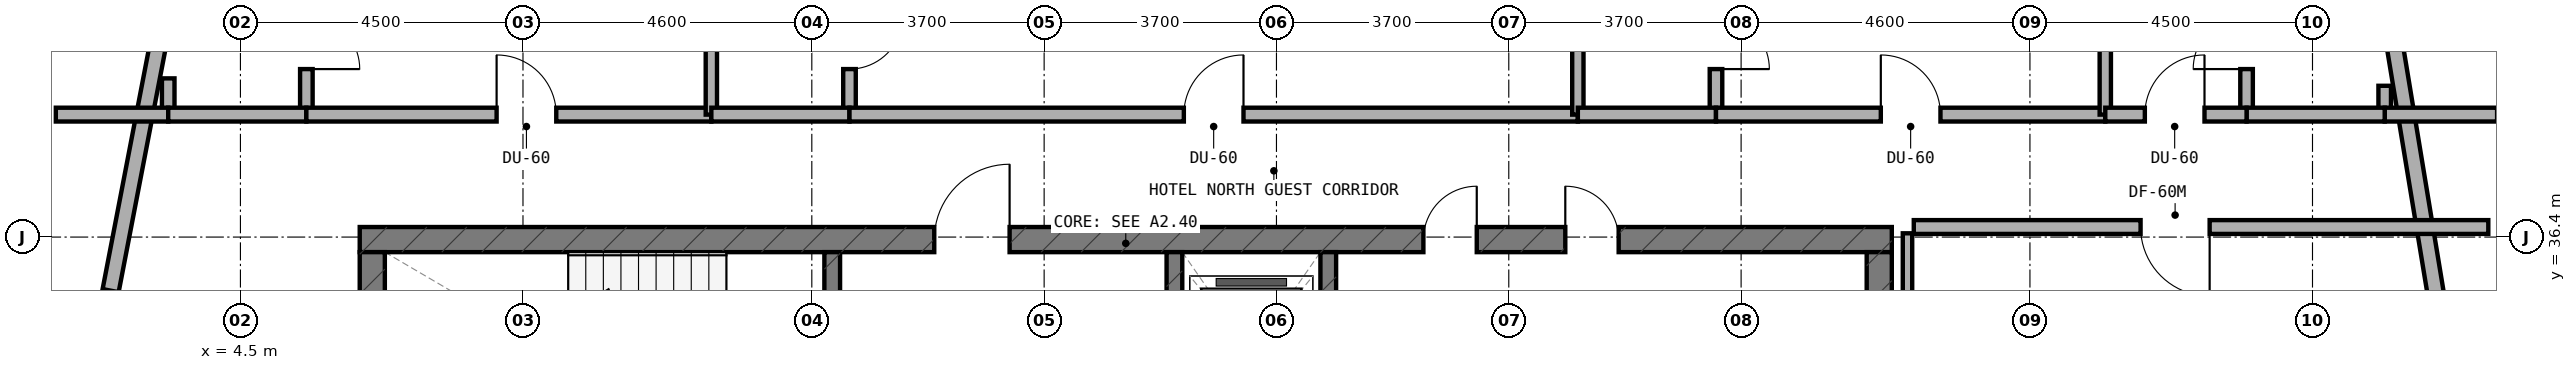
"""IFC4 building model, lengths in metres.
Left out: names, types, materials, properties, quantities, classifications, styles, units other than length and angle.
Written with IfcOpenShell. Run it as: python <this file> out.ifc"""

import sys

from ifc_helpers import new_model, si_unit, direction, frame, frame_2d, origin, place, context, subcontext, project, spatial, rectangle, extrude, element, fill, save


model = new_model("IFC4")
c1 = context("Model", 3, precision=1e-05, world=origin(), true_north=direction((0.0, 1.0)))
c2 = subcontext(c1, "Body", "Model", "MODEL_VIEW")
j1 = project(units=[si_unit("LENGTHUNIT", "METRE"), si_unit("PLANEANGLEUNIT", "RADIAN")], contexts=[c1])
p1 = place(None, origin())
s1 = spatial("IfcSite", under=j1, at=p1, CompositionType="ELEMENT")
p2 = place(p1, origin())
s2 = spatial("IfcBuilding", under=s1, at=p2, CompositionType="ELEMENT")
p3 = place(p2, frame((0.0, 0.0, 177.5)))
s3 = spatial("IfcBuildingStorey", under=s2, at=p3, CompositionType="ELEMENT", Elevation=177.5)
p4 = place(p3, frame((6.4, 36.36, 0.0), z_axis=(0.0, 0.0, 1.0), x_axis=(1.0, 0.0, 0.0)))
e1 = element("IfcWall", 1, at=p4, inside=s3, PredefinedType="SHEAR", context=c2, shape_type="SweptSolid", body=[
    extrude(rectangle(XDim=24.4, YDim=0.4, at=frame_2d((12.2, 0.0))), origin(), (0.0, 0.0, 1.0), 3.6),
])
p5 = place(p4, frame((9.15, 0.0, 0.0)))
e2 = element("IfcOpeningElement", 2, at=p5, cuts=e1, PredefinedType="OPENING", context=c2, shape_type="SweptSolid", body=[
    extrude(rectangle(XDim=1.2, YDim=2.15, at=frame_2d((0.6, 1.075))), frame((0.0, 0.21, 0.0), z_axis=(0.0, -1.0, 0.0), x_axis=(1.0, 0.0, 0.0)), (0.0, 0.0, 1.0), 0.42),
])
p6 = place(p4, frame((19.2, 0.0, 0.0)))
e3 = element("IfcOpeningElement", 3, at=p6, cuts=e1, PredefinedType="OPENING", context=c2, shape_type="SweptSolid", body=[
    extrude(rectangle(XDim=0.85, YDim=2.1, at=frame_2d((0.425, 1.05))), frame((0.0, 0.21, 0.0), z_axis=(0.0, -1.0, 0.0), x_axis=(1.0, 0.0, 0.0)), (0.0, 0.0, 1.0), 0.42),
])
p7 = place(p4, frame((16.94, 0.0, 0.0)))
e4 = element("IfcOpeningElement", 4, at=p7, cuts=e1, PredefinedType="OPENING", context=c2, shape_type="SweptSolid", body=[
    extrude(rectangle(XDim=0.85, YDim=2.1, at=frame_2d((0.425, 1.05))), frame((0.0, 0.21, 0.0), z_axis=(0.0, -1.0, 0.0), x_axis=(1.0, 0.0, 0.0)), (0.0, 0.0, 1.0), 0.42),
])
for number, where, z_axis, x_axis in (
    (5, (6.6, 33.0, 0.0), (0.0, 0.0, 1.0), (0.0, 1.0, 0.0)),
    (6, (30.6, 33.0, 0.0), (0.0, 0.0, 1.0), (0.0, 1.0, 0.0)),
):
    element("IfcWall", number, at=place(p3, frame(where, z_axis=z_axis, x_axis=x_axis)), inside=s3, PredefinedType="SHEAR", context=c2, shape_type="SweptSolid", body=[
        extrude(rectangle(XDim=3.16, YDim=0.4, at=frame_2d((1.58, 0.0))), origin(), (0.0, 0.0, 1.0), 3.6),
    ])
p8 = place(p3, frame((13.925, 33.0, 0.0), z_axis=(0.0, 0.0, 1.0), x_axis=(0.0, 1.0, 0.0)))
e7 = element("IfcWall", 7, at=p8, inside=s3, PredefinedType="STANDARD", context=c2, shape_type="SweptSolid", body=[
    extrude(rectangle(XDim=3.16, YDim=0.25, at=frame_2d((1.58, 0.0))), origin(), (0.0, 0.0, 1.0), 3.32),
])
p9 = place(p8, frame((0.98, 0.0, 0.0)))
e8 = element("IfcOpeningElement", 8, at=p9, cuts=e7, PredefinedType="OPENING", context=c2, shape_type="SweptSolid", body=[
    extrude(rectangle(XDim=1.1, YDim=2.15, at=frame_2d((0.55, 1.075))), frame((0.0, 0.135, 0.0), z_axis=(0.0, -1.0, 0.0), x_axis=(1.0, 0.0, 0.0)), (0.0, 0.0, 1.0), 0.27),
])
p10 = place(p3, frame((19.375, 33.0, 0.0), z_axis=(0.0, 0.0, 1.0), x_axis=(0.0, 1.0, 0.0)))
e9 = element("IfcWall", 9, at=p10, inside=s3, PredefinedType="STANDARD", context=c2, shape_type="SweptSolid", body=[
    extrude(rectangle(XDim=3.16, YDim=0.25, at=frame_2d((1.58, 0.0))), origin(), (0.0, 0.0, 1.0), 3.32),
])
p11 = place(p10, frame((0.98, 0.0, 0.0)))
e10 = element("IfcOpeningElement", 10, at=p11, cuts=e9, PredefinedType="OPENING", context=c2, shape_type="SweptSolid", body=[
    extrude(rectangle(XDim=1.1, YDim=2.15, at=frame_2d((0.55, 1.075))), frame((0.0, 0.135, 0.0), z_axis=(0.0, -1.0, 0.0), x_axis=(1.0, 0.0, 0.0)), (0.0, 0.0, 1.0), 0.27),
])
p12 = place(p3, frame((21.825, 33.0, 0.0), z_axis=(0.0, 0.0, 1.0), x_axis=(0.0, 1.0, 0.0)))
e11 = element("IfcWall", 11, at=p12, inside=s3, PredefinedType="STANDARD", context=c2, shape_type="SweptSolid", body=[
    extrude(rectangle(XDim=3.16, YDim=0.25, at=frame_2d((1.58, 0.0))), origin(), (0.0, 0.0, 1.0), 3.32),
])
p13 = place(p3, frame((40.476, 29.354, 0.0), z_axis=(0.0, 0.0, 1.0), x_axis=(-0.162811037825, 0.986657268742, 0.0)))
e12 = element("IfcWall", 12, at=p13, inside=s3, PredefinedType="STANDARD", context=c2, shape_type="SweptSolid", body=[
    extrude(rectangle(XDim=10.473, YDim=0.26, at=frame_2d((5.236, 0.0))), origin(), (0.0, 0.0, 1.0), 3.32),
])
p14 = place(p13, frame((2.545, 0.0, 0.85)))
e13 = element("IfcOpeningElement", 13, at=p14, cuts=e12, PredefinedType="OPENING", context=c2, shape_type="SweptSolid", body=[
    extrude(rectangle(XDim=2.1, YDim=1.5, at=frame_2d((1.05, 0.75))), frame((0.0, 0.14, 0.0), z_axis=(0.0, -1.0, 0.0), x_axis=(1.0, 0.0, 0.0)), (0.0, 0.0, 1.0), 0.28),
])
p15 = place(p3, frame((3.23, 39.683, 0.0), z_axis=(0.0, 0.0, 1.0), x_axis=(-0.189254809039, -0.98192801022, 0.0)))
e14 = element("IfcWall", 14, at=p15, inside=s3, PredefinedType="STANDARD", context=c2, shape_type="SweptSolid", body=[
    extrude(rectangle(XDim=9.046, YDim=0.26, at=frame_2d((4.523, 0.0))), origin(), (0.0, 0.0, 1.0), 3.32),
])
p16 = place(p15, frame((4.212, 0.0, 0.85)))
e15 = element("IfcOpeningElement", 15, at=p16, cuts=e14, PredefinedType="OPENING", context=c2, shape_type="SweptSolid", body=[
    extrude(rectangle(XDim=2.1, YDim=1.5, at=frame_2d((1.05, 0.75))), frame((0.0, 0.14, 0.0), z_axis=(0.0, -1.0, 0.0), x_axis=(1.0, 0.0, 0.0)), (0.0, 0.0, 1.0), 0.28),
])
p17 = place(p3, frame((5.55, 38.45, 0.0), z_axis=(0.0, 0.0, 1.0), x_axis=(0.0, 1.0, 0.0)))
e16 = element("IfcWall", 16, at=p17, inside=s3, PredefinedType="PLUMBINGWALL", context=c2, shape_type="SweptSolid", body=[
    extrude(rectangle(XDim=2.1, YDim=0.2, at=frame_2d((1.05, 0.0))), origin(), (0.0, 0.0, 1.0), 3.32),
])
p18 = place(p17, frame((0.625, 0.0, 0.0)))
e17 = element("IfcOpeningElement", 17, at=p18, cuts=e16, PredefinedType="OPENING", context=c2, shape_type="SweptSolid", body=[
    extrude(rectangle(XDim=0.85, YDim=2.1, at=frame_2d((0.425, 1.05))), frame((0.0, 0.11, 0.0), z_axis=(0.0, -1.0, 0.0), x_axis=(1.0, 0.0, 0.0)), (0.0, 0.0, 1.0), 0.22),
])
p19 = place(p3, frame((3.35, 38.35, 0.0), z_axis=(0.0, 0.0, 1.0), x_axis=(0.0, 1.0, 0.0)))
e18 = element("IfcWall", 18, at=p19, inside=s3, PredefinedType="PLUMBINGWALL", context=c2, shape_type="SweptSolid", body=[
    extrude(rectangle(XDim=0.577, YDim=0.2, at=frame_2d((0.289, 0.0))), origin(), (0.0, 0.0, 1.0), 3.32),
])
p20 = place(p3, frame((1.56, 38.35, 0.0), z_axis=(0.0, 0.0, 1.0), x_axis=(1.0, 0.0, 0.0)))
e19 = element("IfcWall", 19, at=p20, inside=s3, PredefinedType="SOLIDWALL", context=c2, shape_type="SweptSolid", body=[
    extrude(rectangle(XDim=1.79, YDim=0.22, at=frame_2d((0.895, 0.0))), origin(), (0.0, 0.0, 1.0), 3.32),
])
p21 = place(p3, frame((3.35, 38.35, 0.0), z_axis=(0.0, 0.0, 1.0), x_axis=(1.0, 0.0, 0.0)))
e20 = element("IfcWall", 20, at=p21, inside=s3, PredefinedType="SOLIDWALL", context=c2, shape_type="SweptSolid", body=[
    extrude(rectangle(XDim=2.2, YDim=0.22, at=frame_2d((1.1, 0.0))), origin(), (0.0, 0.0, 1.0), 3.32),
])
p22 = place(p3, frame((5.55, 38.35, 0.0), z_axis=(0.0, 0.0, 1.0), x_axis=(1.0, 0.0, 0.0)))
e21 = element("IfcWall", 21, at=p22, inside=s3, PredefinedType="SOLIDWALL", context=c2, shape_type="SweptSolid", body=[
    extrude(rectangle(XDim=6.45, YDim=0.22, at=frame_2d((3.225, 0.0))), origin(), (0.0, 0.0, 1.0), 2.995),
])
p23 = place(p22, frame((3.03, 0.0, 0.0)))
e22 = element("IfcOpeningElement", 22, at=p23, cuts=e21, PredefinedType="OPENING", context=c2, shape_type="SweptSolid", body=[
    extrude(rectangle(XDim=0.95, YDim=2.1, at=frame_2d((0.475, 1.05))), frame((0.0, 0.12, 0.0), z_axis=(0.0, -1.0, 0.0), x_axis=(1.0, 0.0, 0.0)), (0.0, 0.0, 1.0), 0.24),
])
p24 = place(p3, frame((12.0, 38.35, 0.0), z_axis=(0.0, 0.0, 1.0), x_axis=(0.0, 1.0, 0.0)))
e23 = element("IfcWall", 23, at=p24, inside=s3, PredefinedType="SOLIDWALL", context=c2, shape_type="SweptSolid", body=[
    extrude(rectangle(XDim=5.588, YDim=0.18, at=frame_2d((2.794, 0.0))), origin(), (0.0, 0.0, 1.0), 2.845),
])
p25 = place(p3, frame((14.2, 38.45, 0.0), z_axis=(0.0, 0.0, 1.0), x_axis=(0.0, 1.0, 0.0)))
e24 = element("IfcWall", 24, at=p25, inside=s3, PredefinedType="PLUMBINGWALL", context=c2, shape_type="SweptSolid", body=[
    extrude(rectangle(XDim=2.1, YDim=0.2, at=frame_2d((1.05, 0.0))), origin(), (0.0, 0.0, 1.0), 2.845),
])
p26 = place(p25, frame((0.625, 0.0, 0.0)))
e25 = element("IfcOpeningElement", 25, at=p26, cuts=e24, PredefinedType="OPENING", context=c2, shape_type="SweptSolid", body=[
    extrude(rectangle(XDim=0.85, YDim=2.1, at=frame_2d((0.425, 1.05))), frame((0.0, 0.11, 0.0), z_axis=(0.0, -1.0, 0.0), x_axis=(1.0, 0.0, 0.0)), (0.0, 0.0, 1.0), 0.22),
])
p27 = place(p3, frame((12.0, 38.35, 0.0), z_axis=(0.0, 0.0, 1.0), x_axis=(1.0, 0.0, 0.0)))
e26 = element("IfcWall", 26, at=p27, inside=s3, PredefinedType="SOLIDWALL", context=c2, shape_type="SweptSolid", body=[
    extrude(rectangle(XDim=2.2, YDim=0.22, at=frame_2d((1.1, 0.0))), origin(), (0.0, 0.0, 1.0), 3.32),
])
p28 = place(p3, frame((14.2, 38.35, 0.0), z_axis=(0.0, 0.0, 1.0), x_axis=(1.0, 0.0, 0.0)))
e27 = element("IfcWall", 27, at=p28, inside=s3, PredefinedType="SOLIDWALL", context=c2, shape_type="SweptSolid", body=[
    extrude(rectangle(XDim=11.6, YDim=0.22, at=frame_2d((5.8, 0.0))), origin(), (0.0, 0.0, 1.0), 2.995),
])
p29 = place(p28, frame((5.325, 0.0, 0.0)))
e28 = element("IfcOpeningElement", 28, at=p29, cuts=e27, PredefinedType="OPENING", context=c2, shape_type="SweptSolid", body=[
    extrude(rectangle(XDim=0.95, YDim=2.1, at=frame_2d((0.475, 1.05))), frame((0.0, 0.12, 0.0), z_axis=(0.0, -1.0, 0.0), x_axis=(1.0, 0.0, 0.0)), (0.0, 0.0, 1.0), 0.24),
])
p30 = place(p3, frame((25.8, 38.35, 0.0), z_axis=(0.0, 0.0, 1.0), x_axis=(0.0, 1.0, 0.0)))
e29 = element("IfcWall", 29, at=p30, inside=s3, PredefinedType="SOLIDWALL", context=c2, shape_type="SweptSolid", body=[
    extrude(rectangle(XDim=6.19, YDim=0.18, at=frame_2d((3.095, 0.0))), origin(), (0.0, 0.0, 1.0), 2.935),
])
p31 = place(p3, frame((28.0, 38.45, 0.0), z_axis=(0.0, 0.0, 1.0), x_axis=(0.0, 1.0, 0.0)))
e30 = element("IfcWall", 30, at=p31, inside=s3, PredefinedType="PLUMBINGWALL", context=c2, shape_type="SweptSolid", body=[
    extrude(rectangle(XDim=2.1, YDim=0.2, at=frame_2d((1.05, 0.0))), origin(), (0.0, 0.0, 1.0), 2.845),
])
p32 = place(p31, frame((0.625, 0.0, 0.0)))
e31 = element("IfcOpeningElement", 31, at=p32, cuts=e30, PredefinedType="OPENING", context=c2, shape_type="SweptSolid", body=[
    extrude(rectangle(XDim=0.85, YDim=2.1, at=frame_2d((0.425, 1.05))), frame((0.0, 0.11, 0.0), z_axis=(0.0, -1.0, 0.0), x_axis=(1.0, 0.0, 0.0)), (0.0, 0.0, 1.0), 0.22),
])
p33 = place(p3, frame((25.8, 38.35, 0.0), z_axis=(0.0, 0.0, 1.0), x_axis=(1.0, 0.0, 0.0)))
e32 = element("IfcWall", 32, at=p33, inside=s3, PredefinedType="SOLIDWALL", context=c2, shape_type="SweptSolid", body=[
    extrude(rectangle(XDim=2.2, YDim=0.22, at=frame_2d((1.1, 0.0))), origin(), (0.0, 0.0, 1.0), 2.995),
])
p34 = place(p3, frame((28.0, 38.35, 0.0), z_axis=(0.0, 0.0, 1.0), x_axis=(1.0, 0.0, 0.0)))
e33 = element("IfcWall", 33, at=p34, inside=s3, PredefinedType="SOLIDWALL", context=c2, shape_type="SweptSolid", body=[
    extrude(rectangle(XDim=6.2, YDim=0.22, at=frame_2d((3.1, 0.0))), origin(), (0.0, 0.0, 1.0), 2.995),
])
p35 = place(p34, frame((2.625, 0.0, 0.0)))
e34 = element("IfcOpeningElement", 34, at=p35, cuts=e33, PredefinedType="OPENING", context=c2, shape_type="SweptSolid", body=[
    extrude(rectangle(XDim=0.95, YDim=2.1, at=frame_2d((0.475, 1.05))), frame((0.0, 0.12, 0.0), z_axis=(0.0, -1.0, 0.0), x_axis=(1.0, 0.0, 0.0)), (0.0, 0.0, 1.0), 0.24),
])
p36 = place(p3, frame((34.2, 38.35, 0.0), z_axis=(0.0, 0.0, 1.0), x_axis=(0.0, 1.0, 0.0)))
e35 = element("IfcWall", 35, at=p36, inside=s3, PredefinedType="SOLIDWALL", context=c2, shape_type="SweptSolid", body=[
    extrude(rectangle(XDim=4.778, YDim=0.18, at=frame_2d((2.389, 0.0))), origin(), (0.0, 0.0, 1.0), 2.935),
])
p37 = place(p3, frame((36.45, 38.45, 0.0), z_axis=(0.0, 0.0, 1.0), x_axis=(0.0, 1.0, 0.0)))
e36 = element("IfcWall", 36, at=p37, inside=s3, PredefinedType="PLUMBINGWALL", context=c2, shape_type="SweptSolid", body=[
    extrude(rectangle(XDim=2.1, YDim=0.2, at=frame_2d((1.05, 0.0))), origin(), (0.0, 0.0, 1.0), 3.32),
])
p38 = place(p37, frame((0.625, 0.0, 0.0)))
e37 = element("IfcOpeningElement", 37, at=p38, cuts=e36, PredefinedType="OPENING", context=c2, shape_type="SweptSolid", body=[
    extrude(rectangle(XDim=0.85, YDim=2.1, at=frame_2d((0.425, 1.05))), frame((0.0, 0.11, 0.0), z_axis=(0.0, -1.0, 0.0), x_axis=(1.0, 0.0, 0.0)), (0.0, 0.0, 1.0), 0.22),
])
p39 = place(p3, frame((38.65, 38.35, 0.0), z_axis=(0.0, 0.0, 1.0), x_axis=(0.0, 1.0, 0.0)))
e38 = element("IfcWall", 38, at=p39, inside=s3, PredefinedType="PLUMBINGWALL", context=c2, shape_type="SweptSolid", body=[
    extrude(rectangle(XDim=0.459, YDim=0.2, at=frame_2d((0.229, 0.0))), origin(), (0.0, 0.0, 1.0), 3.32),
])
p40 = place(p3, frame((38.65, 38.35, 0.0), z_axis=(0.0, 0.0, 1.0), x_axis=(1.0, 0.0, 0.0)))
e39 = element("IfcWall", 39, at=p40, inside=s3, PredefinedType="SOLIDWALL", context=c2, shape_type="SweptSolid", body=[
    extrude(rectangle(XDim=1.79, YDim=0.22, at=frame_2d((0.895, 0.0))), origin(), (0.0, 0.0, 1.0), 3.32),
])
p41 = place(p3, frame((36.45, 38.35, 0.0), z_axis=(0.0, 0.0, 1.0), x_axis=(1.0, 0.0, 0.0)))
e40 = element("IfcWall", 40, at=p41, inside=s3, PredefinedType="SOLIDWALL", context=c2, shape_type="SweptSolid", body=[
    extrude(rectangle(XDim=2.2, YDim=0.22, at=frame_2d((1.1, 0.0))), origin(), (0.0, 0.0, 1.0), 3.32),
])
p42 = place(p3, frame((34.2, 38.35, 0.0), z_axis=(0.0, 0.0, 1.0), x_axis=(1.0, 0.0, 0.0)))
e41 = element("IfcWall", 41, at=p42, inside=s3, PredefinedType="SOLIDWALL", context=c2, shape_type="SweptSolid", body=[
    extrude(rectangle(XDim=2.25, YDim=0.22, at=frame_2d((1.125, 0.0))), origin(), (0.0, 0.0, 1.0), 2.935),
])
p43 = place(p42, frame((0.63, 0.0, 0.0)))
e42 = element("IfcOpeningElement", 42, at=p43, cuts=e41, PredefinedType="OPENING", context=c2, shape_type="SweptSolid", body=[
    extrude(rectangle(XDim=0.95, YDim=2.1, at=frame_2d((0.475, 1.05))), frame((0.0, 0.12, 0.0), z_axis=(0.0, -1.0, 0.0), x_axis=(1.0, 0.0, 0.0)), (0.0, 0.0, 1.0), 0.24),
])
p44 = place(p3, frame((31.05, 29.8, 0.0), z_axis=(0.0, 0.0, 1.0), x_axis=(0.0, 1.0, 0.0)))
e43 = element("IfcWall", 43, at=p44, inside=s3, PredefinedType="PARTITIONING", context=c2, shape_type="SweptSolid", body=[
    extrude(rectangle(XDim=6.66, YDim=0.15, at=frame_2d((3.33, 0.0))), origin(), (0.0, 0.0, 1.0), 2.995),
])
p45 = place(p3, frame((31.15, 36.56, 0.0), z_axis=(0.0, 0.0, 1.0), x_axis=(1.0, 0.0, 0.0)))
e44 = element("IfcWall", 44, at=p45, inside=s3, PredefinedType="SOLIDWALL", context=c2, shape_type="SweptSolid", body=[
    extrude(rectangle(XDim=9.15, YDim=0.22, at=frame_2d((4.575, 0.0))), origin(), (0.0, 0.0, 1.0), 2.935),
])
p46 = place(p45, frame((3.612, 0.0, 0.0)))
e45 = element("IfcOpeningElement", 45, at=p46, cuts=e44, PredefinedType="OPENING", context=c2, shape_type="SweptSolid", body=[
    extrude(rectangle(XDim=1.1, YDim=2.1, at=frame_2d((0.55, 1.05))), frame((0.0, 0.12, 0.0), z_axis=(0.0, -1.0, 0.0), x_axis=(1.0, 0.0, 0.0)), (0.0, 0.0, 1.0), 0.24),
])
p47 = place(p5, origin())
e46 = element("IfcDoor", 46, at=p47, inside=s3, OperationType="SINGLE_SWING_RIGHT", PredefinedType="DOOR", context=c2, shape_type="SweptSolid", body=[
    extrude(rectangle(XDim=1.2, YDim=2.15, at=frame_2d((0.6, 1.075))), frame((0.0, 0.025, 0.0), z_axis=(0.0, -1.0, 0.0), x_axis=(1.0, 0.0, 0.0)), (0.0, 0.0, 1.0), 0.05),
])
fill(e2, e46)
p48 = place(p6, origin())
e47 = element("IfcDoor", 47, at=p48, inside=s3, OperationType="SINGLE_SWING_LEFT", PredefinedType="DOOR", context=c2, shape_type="SweptSolid", body=[
    extrude(rectangle(XDim=0.85, YDim=2.1, at=frame_2d((0.425, 1.05))), frame((0.0, 0.025, 0.0), z_axis=(0.0, -1.0, 0.0), x_axis=(1.0, 0.0, 0.0)), (0.0, 0.0, 1.0), 0.05),
])
fill(e3, e47)
p49 = place(p7, origin())
e48 = element("IfcDoor", 48, at=p49, inside=s3, OperationType="SINGLE_SWING_RIGHT", PredefinedType="DOOR", context=c2, shape_type="SweptSolid", body=[
    extrude(rectangle(XDim=0.85, YDim=2.1, at=frame_2d((0.425, 1.05))), frame((0.0, 0.025, 0.0), z_axis=(0.0, -1.0, 0.0), x_axis=(1.0, 0.0, 0.0)), (0.0, 0.0, 1.0), 0.05),
])
fill(e4, e48)
p50 = place(p18, frame((0.85, 0.0, 0.0), z_axis=(0.0, 0.0, 1.0), x_axis=(-1.0, 0.0, 0.0)))
e49 = element("IfcDoor", 49, at=p50, inside=s3, OperationType="SINGLE_SWING_RIGHT", PredefinedType="DOOR", context=c2, shape_type="SweptSolid", body=[
    extrude(rectangle(XDim=0.85, YDim=2.1, at=frame_2d((0.425, 1.05))), frame((0.0, 0.025, 0.0), z_axis=(0.0, -1.0, 0.0), x_axis=(1.0, 0.0, 0.0)), (0.0, 0.0, 1.0), 0.05),
])
fill(e17, e49)
p51 = place(p23, origin())
e50 = element("IfcDoor", 50, at=p51, inside=s3, OperationType="SINGLE_SWING_LEFT", PredefinedType="DOOR", context=c2, shape_type="SweptSolid", body=[
    extrude(rectangle(XDim=0.95, YDim=2.1, at=frame_2d((0.475, 1.05))), frame((0.0, 0.025, 0.0), z_axis=(0.0, -1.0, 0.0), x_axis=(1.0, 0.0, 0.0)), (0.0, 0.0, 1.0), 0.05),
])
fill(e22, e50)
p52 = place(p26, frame((0.85, 0.0, 0.0), z_axis=(0.0, 0.0, 1.0), x_axis=(-1.0, 0.0, 0.0)))
e51 = element("IfcDoor", 51, at=p52, inside=s3, OperationType="SINGLE_SWING_LEFT", PredefinedType="DOOR", context=c2, shape_type="SweptSolid", body=[
    extrude(rectangle(XDim=0.85, YDim=2.1, at=frame_2d((0.425, 1.05))), frame((0.0, 0.025, 0.0), z_axis=(0.0, -1.0, 0.0), x_axis=(1.0, 0.0, 0.0)), (0.0, 0.0, 1.0), 0.05),
])
fill(e25, e51)
p53 = place(p29, origin())
e52 = element("IfcDoor", 52, at=p53, inside=s3, OperationType="SINGLE_SWING_RIGHT", PredefinedType="DOOR", context=c2, shape_type="SweptSolid", body=[
    extrude(rectangle(XDim=0.95, YDim=2.1, at=frame_2d((0.475, 1.05))), frame((0.0, 0.025, 0.0), z_axis=(0.0, -1.0, 0.0), x_axis=(1.0, 0.0, 0.0)), (0.0, 0.0, 1.0), 0.05),
])
fill(e28, e52)
p54 = place(p32, frame((0.85, 0.0, 0.0), z_axis=(0.0, 0.0, 1.0), x_axis=(-1.0, 0.0, 0.0)))
e53 = element("IfcDoor", 53, at=p54, inside=s3, OperationType="SINGLE_SWING_RIGHT", PredefinedType="DOOR", context=c2, shape_type="SweptSolid", body=[
    extrude(rectangle(XDim=0.85, YDim=2.1, at=frame_2d((0.425, 1.05))), frame((0.0, 0.025, 0.0), z_axis=(0.0, -1.0, 0.0), x_axis=(1.0, 0.0, 0.0)), (0.0, 0.0, 1.0), 0.05),
])
fill(e31, e53)
p55 = place(p35, origin())
e54 = element("IfcDoor", 54, at=p55, inside=s3, OperationType="SINGLE_SWING_LEFT", PredefinedType="DOOR", context=c2, shape_type="SweptSolid", body=[
    extrude(rectangle(XDim=0.95, YDim=2.1, at=frame_2d((0.475, 1.05))), frame((0.0, 0.025, 0.0), z_axis=(0.0, -1.0, 0.0), x_axis=(1.0, 0.0, 0.0)), (0.0, 0.0, 1.0), 0.05),
])
fill(e34, e54)
p56 = place(p38, origin())
e55 = element("IfcDoor", 55, at=p56, inside=s3, OperationType="SINGLE_SWING_LEFT", PredefinedType="DOOR", context=c2, shape_type="SweptSolid", body=[
    extrude(rectangle(XDim=0.85, YDim=2.1, at=frame_2d((0.425, 1.05))), frame((0.0, 0.025, 0.0), z_axis=(0.0, -1.0, 0.0), x_axis=(1.0, 0.0, 0.0)), (0.0, 0.0, 1.0), 0.05),
])
fill(e37, e55)
p57 = place(p43, origin())
e56 = element("IfcDoor", 56, at=p57, inside=s3, OperationType="SINGLE_SWING_RIGHT", PredefinedType="DOOR", context=c2, shape_type="SweptSolid", body=[
    extrude(rectangle(XDim=0.95, YDim=2.1, at=frame_2d((0.475, 1.05))), frame((0.0, 0.025, 0.0), z_axis=(0.0, -1.0, 0.0), x_axis=(1.0, 0.0, 0.0)), (0.0, 0.0, 1.0), 0.05),
])
fill(e42, e56)
p58 = place(p46, frame((1.1, 0.0, 0.0), z_axis=(0.0, 0.0, 1.0), x_axis=(-1.0, 0.0, 0.0)))
e57 = element("IfcDoor", 57, at=p58, inside=s3, OperationType="SINGLE_SWING_LEFT", PredefinedType="DOOR", context=c2, shape_type="SweptSolid", body=[
    extrude(rectangle(XDim=1.1, YDim=2.1, at=frame_2d((0.55, 1.05))), frame((0.0, 0.025, 0.0), z_axis=(0.0, -1.0, 0.0), x_axis=(1.0, 0.0, 0.0)), (0.0, 0.0, 1.0), 0.05),
])
fill(e45, e57)
save(model, sys.argv[1])
